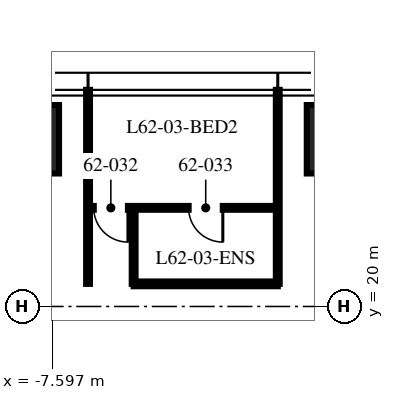
"""IFC4 building model, lengths in metres.
Left out: names, types, materials, properties, quantities, classifications, styles, units other than length and angle.
Written with IfcOpenShell. Run it as: python <this file> out.ifc"""

import sys

from ifc_helpers import new_model, si_unit, direction, frame, frame_2d, origin, origin_2d, place, context, subcontext, project, spatial, rectangle, extrude, element, fill, save


model = new_model("IFC4")
c1 = context("Model", 3, precision=1e-05, world=origin(), true_north=direction((0.0, 1.0)))
c2 = subcontext(c1, "Body", "Model", "MODEL_VIEW")
j1 = project(units=[si_unit("LENGTHUNIT", "METRE"), si_unit("PLANEANGLEUNIT", "RADIAN")], contexts=[c1])
p1 = place(None, origin())
s1 = spatial("IfcSite", under=j1, at=p1, CompositionType="ELEMENT")
p2 = place(p1, origin())
s2 = spatial("IfcBuilding", under=s1, at=p2, CompositionType="ELEMENT")
p3 = place(p2, frame((0.0, 0.0, 248.25)))
s3 = spatial("IfcBuildingStorey", under=s2, at=p3, CompositionType="ELEMENT", Elevation=248.25)
for number, where, z_axis, x_axis in (
    (1, (-8.32, 24.4, 0.0), (0.0, 0.0, 1.0), (1.0, 0.0, 0.0)),
    (2, (0.0, 24.4, 0.0), (0.0, 0.0, 1.0), (1.0, 0.0, 0.0)),
):
    element("IfcColumn", number, at=place(p3, frame(where, z_axis=z_axis, x_axis=x_axis)), inside=s3, PredefinedType="COLUMN", context=c2, shape_type="SweptSolid", body=[
        extrude(rectangle(XDim=1.8, YDim=1.8, at=origin_2d()), origin(), (0.0, 0.0, 1.0), 3.75),
    ])
for number, where, z_axis, x_axis in (
    (3, (-1.664, 20.595, 0.0), (0.0, 0.0, 1.0), (0.0, 1.0, 0.0)),
    (4, (-6.656, 20.595, 0.0), (0.0, 0.0, 1.0), (0.0, 1.0, 0.0)),
):
    element("IfcWall", number, at=place(p3, frame(where, z_axis=z_axis, x_axis=x_axis)), inside=s3, PredefinedType="PARTITIONING", context=c2, shape_type="SweptSolid", body=[
        extrude(rectangle(XDim=5.105, YDim=0.1, at=frame_2d((2.552, 0.0))), origin(), (0.0, 0.0, 1.0), 2.91),
    ])
p4 = place(p3, frame((-1.664, 22.595, 0.0), z_axis=(0.0, 0.0, 1.0), x_axis=(-1.0, 0.0, 0.0)))
e5 = element("IfcWall", 5, at=p4, inside=s3, PredefinedType="PARTITIONING", context=c2, shape_type="SweptSolid", body=[
    extrude(rectangle(XDim=4.992, YDim=0.1, at=frame_2d((2.496, 0.0))), origin(), (0.0, 0.0, 1.0), 2.81),
])
p5 = place(p4, frame((3.942, 0.0, 0.0)))
e6 = element("IfcOpeningElement", 6, at=p5, cuts=e5, PredefinedType="OPENING", context=c2, shape_type="SweptSolid", body=[
    extrude(rectangle(XDim=0.9, YDim=2.1, at=frame_2d((0.45, 1.05))), frame((0.0, 0.06, 0.0), z_axis=(0.0, -1.0, 0.0), x_axis=(1.0, 0.0, 0.0)), (0.0, 0.0, 1.0), 0.12),
])
p6 = place(p4, frame((1.446, 0.0, 0.0)))
e7 = element("IfcOpeningElement", 7, at=p6, cuts=e5, PredefinedType="OPENING", context=c2, shape_type="SweptSolid", body=[
    extrude(rectangle(XDim=0.9, YDim=2.1, at=frame_2d((0.45, 1.05))), frame((0.0, 0.06, 0.0), z_axis=(0.0, -1.0, 0.0), x_axis=(1.0, 0.0, 0.0)), (0.0, 0.0, 1.0), 0.12),
])
p7 = place(p3, frame((-5.456, 20.595, 0.0), z_axis=(0.0, 0.0, 1.0), x_axis=(0.0, 1.0, 0.0)))
e8 = element("IfcWall", 8, at=p7, inside=s3, PredefinedType="PARTITIONING", context=c2, shape_type="SweptSolid", body=[
    extrude(rectangle(XDim=2.0, YDim=0.1, at=frame_2d((1.0, 0.0))), origin(), (0.0, 0.0, 1.0), 3.5),
])
p8 = place(p3, frame((-1.664, 20.595, 0.0), z_axis=(0.0, 0.0, 1.0), x_axis=(-1.0, 0.0, 0.0)))
e9 = element("IfcWall", 9, at=p8, inside=s3, PredefinedType="PARTITIONING", context=c2, shape_type="SweptSolid", body=[
    extrude(rectangle(XDim=3.792, YDim=0.125, at=frame_2d((1.896, 0.0))), origin(), (0.0, 0.0, 1.0), 2.81),
])
p9 = place(p5, origin())
e10 = element("IfcDoor", 10, at=p9, inside=s3, OperationType="SINGLE_SWING_LEFT", PredefinedType="DOOR", context=c2, shape_type="SweptSolid", body=[
    extrude(rectangle(XDim=0.9, YDim=2.1, at=frame_2d((0.45, 1.05))), frame((0.0, 0.025, 0.0), z_axis=(0.0, -1.0, 0.0), x_axis=(1.0, 0.0, 0.0)), (0.0, 0.0, 1.0), 0.05),
])
fill(e6, e10)
p10 = place(p6, origin())
e11 = element("IfcDoor", 11, at=p10, inside=s3, OperationType="SINGLE_SWING_LEFT", PredefinedType="DOOR", context=c2, shape_type="SweptSolid", body=[
    extrude(rectangle(XDim=0.9, YDim=2.1, at=frame_2d((0.45, 1.05))), frame((0.0, 0.025, 0.0), z_axis=(0.0, -1.0, 0.0), x_axis=(1.0, 0.0, 0.0)), (0.0, 0.0, 1.0), 0.05),
])
fill(e7, e11)
save(model, sys.argv[1])
